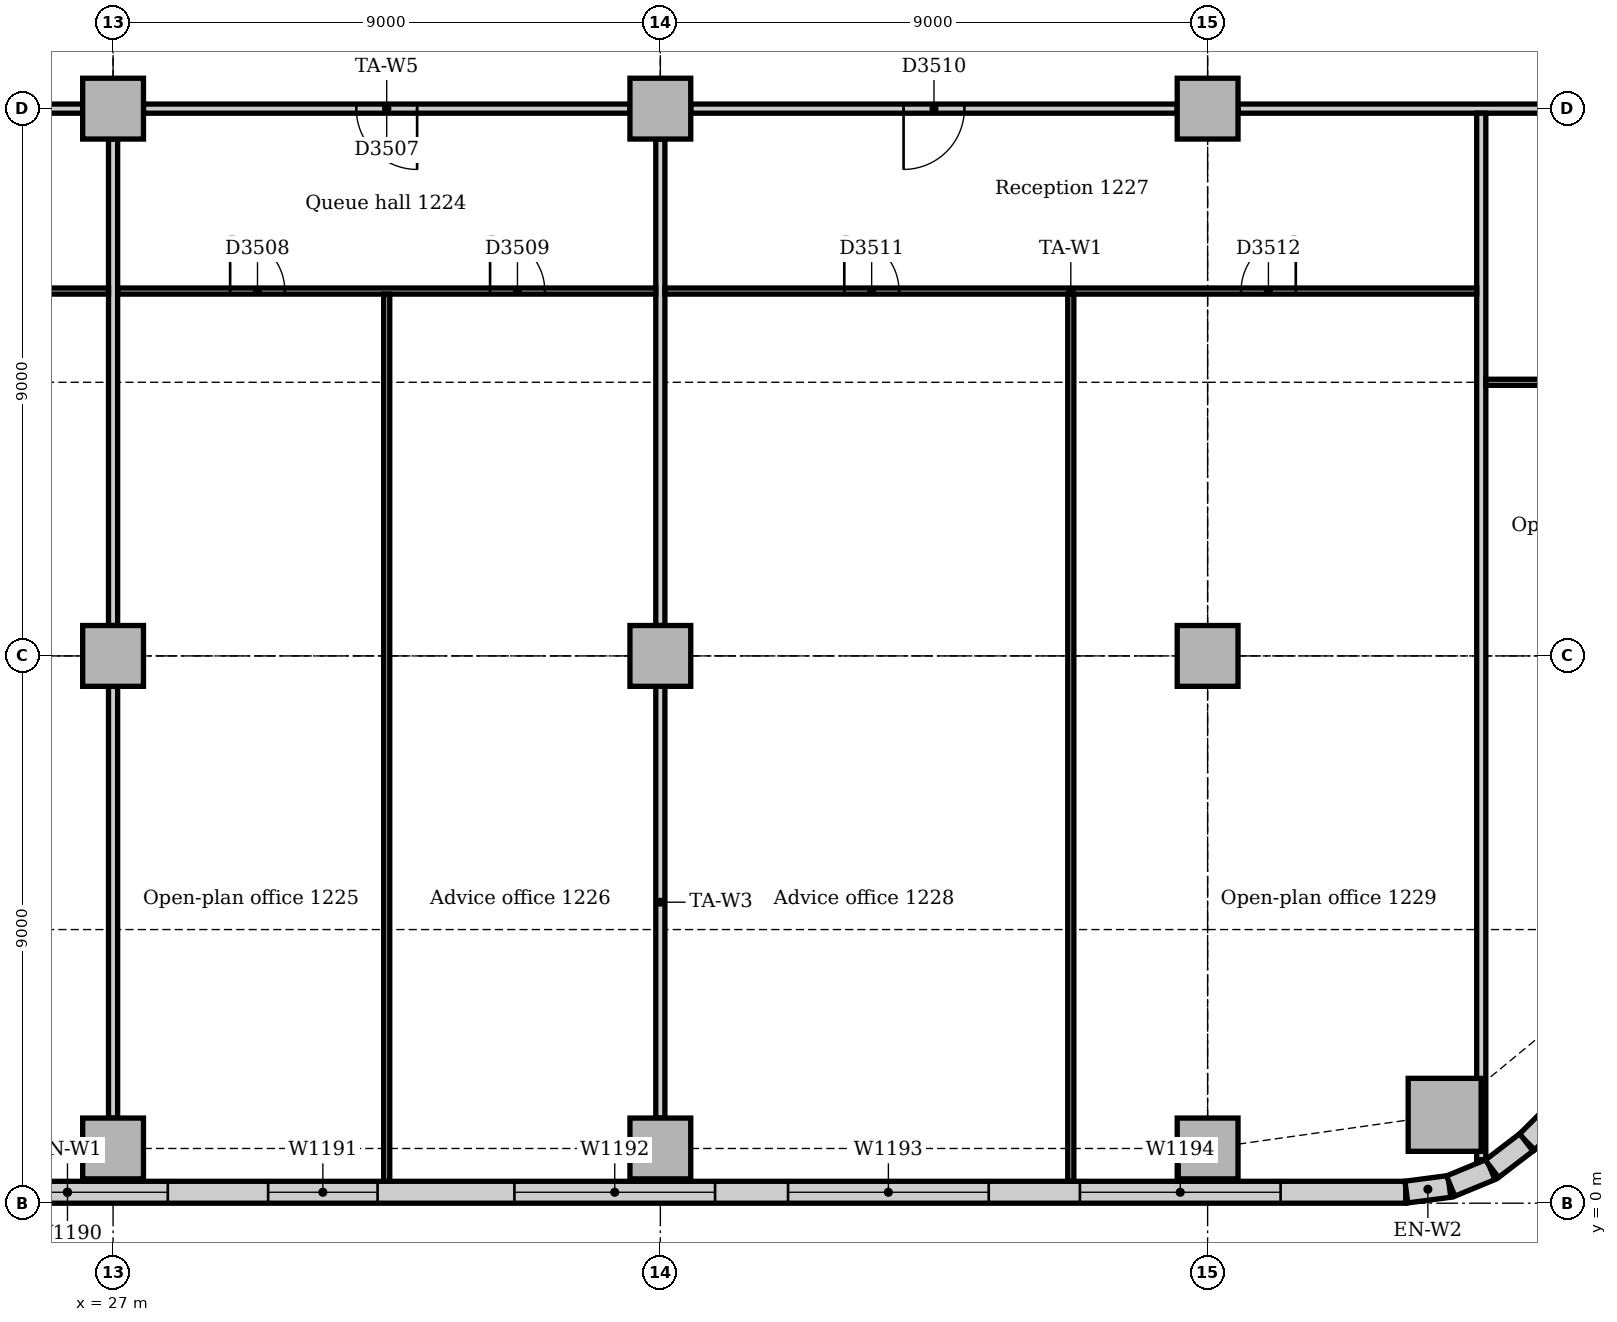
"""IFC4 building model, lengths in metres.
Left out: names, types, materials, properties, quantities, classifications, styles, units other than length and angle.
Written with IfcOpenShell. Run it as: python <this file> out.ifc"""

import sys

from ifc_helpers import new_model, si_unit, direction, frame, frame_2d, origin, origin_2d, place, context, subcontext, project, spatial, rectangle, extrude, element, fill, save


model = new_model("IFC4")
c1 = context("Model", 3, precision=1e-05, world=origin(), true_north=direction((0.0, 1.0)))
c2 = subcontext(c1, "Body", "Model", "MODEL_VIEW")
j1 = project(units=[si_unit("LENGTHUNIT", "METRE"), si_unit("PLANEANGLEUNIT", "RADIAN")], contexts=[c1])
p1 = place(None, origin())
s1 = spatial("IfcSite", under=j1, at=p1, CompositionType="ELEMENT")
p2 = place(p1, origin())
s2 = spatial("IfcBuilding", under=s1, at=p2, CompositionType="ELEMENT")
p3 = place(p2, frame((0.0, 0.0, 55.0)))
s3 = spatial("IfcBuildingStorey", under=s2, at=p3, CompositionType="ELEMENT", Elevation=55.0)
p4 = place(p3, frame((48.898, 1.453, 0.0), z_axis=(0.0, 0.0, 1.0), x_axis=(1.0, 0.0, 0.0)))
e1 = element("IfcColumn", 1, at=p4, inside=s3, PredefinedType="COLUMN", context=c2, shape_type="SweptSolid", body=[
    extrude(rectangle(XDim=1.2, YDim=1.2, at=origin_2d()), origin(), (0.0, 0.0, 1.0), 3.85),
])
for number, where, z_axis, x_axis in (
    (2, (27.0, 0.9, 0.0), (0.0, 0.0, 1.0), (1.0, 0.0, 0.0)),
    (3, (36.0, 0.9, 0.0), (0.0, 0.0, 1.0), (1.0, 0.0, 0.0)),
    (4, (45.0, 0.9, 0.0), (0.0, 0.0, 1.0), (1.0, 0.0, 0.0)),
    (5, (27.0, 9.0, 0.0), (0.0, 0.0, 1.0), (1.0, 0.0, 0.0)),
    (6, (27.0, 18.0, 0.0), (0.0, 0.0, 1.0), (1.0, 0.0, 0.0)),
    (7, (36.0, 9.0, 0.0), (0.0, 0.0, 1.0), (1.0, 0.0, 0.0)),
    (8, (36.0, 18.0, 0.0), (0.0, 0.0, 1.0), (1.0, 0.0, 0.0)),
    (9, (45.0, 9.0, 0.0), (0.0, 0.0, 1.0), (1.0, 0.0, 0.0)),
    (10, (45.0, 18.0, 0.0), (0.0, 0.0, 1.0), (1.0, 0.0, 0.0)),
):
    element("IfcColumn", number, at=place(p3, frame(where, z_axis=z_axis, x_axis=x_axis)), inside=s3, PredefinedType="COLUMN", context=c2, shape_type="SweptSolid", body=[
        extrude(rectangle(XDim=1.0, YDim=1.0, at=origin_2d()), origin(), (0.0, 0.0, 1.0), 3.85),
    ])
p5 = place(p3, frame((4.243, 0.18, 0.0), z_axis=(0.0, 0.0, 1.0), x_axis=(1.0, 0.0, 0.0)))
e11 = element("IfcWall", 11, at=p5, inside=s3, PredefinedType="STANDARD", context=c2, shape_type="SweptSolid", body=[
    extrude(rectangle(XDim=44.015, YDim=0.36, at=frame_2d((22.007, 0.0))), origin(), (0.0, 0.0, 1.0), 3.85),
])
p6 = place(p5, frame((2.707, 0.0, 0.9)))
e12 = element("IfcOpeningElement", 12, at=p6, cuts=e11, PredefinedType="OPENING", context=c2, shape_type="SweptSolid", body=[
    extrude(rectangle(XDim=3.3, YDim=1.6, at=frame_2d((1.65, 0.8))), frame((0.0, 0.19, 0.0), z_axis=(0.0, -1.0, 0.0), x_axis=(1.0, 0.0, 0.0)), (0.0, 0.0, 1.0), 0.38),
])
p7 = place(p5, frame((7.257, 0.0, 0.9)))
e13 = element("IfcOpeningElement", 13, at=p7, cuts=e11, PredefinedType="OPENING", context=c2, shape_type="SweptSolid", body=[
    extrude(rectangle(XDim=1.8, YDim=1.6, at=frame_2d((0.9, 0.8))), frame((0.0, 0.19, 0.0), z_axis=(0.0, -1.0, 0.0), x_axis=(1.0, 0.0, 0.0)), (0.0, 0.0, 1.0), 0.38),
])
p8 = place(p5, frame((11.357, 0.0, 0.9)))
e14 = element("IfcOpeningElement", 14, at=p8, cuts=e11, PredefinedType="OPENING", context=c2, shape_type="SweptSolid", body=[
    extrude(rectangle(XDim=3.3, YDim=1.6, at=frame_2d((1.65, 0.8))), frame((0.0, 0.19, 0.0), z_axis=(0.0, -1.0, 0.0), x_axis=(1.0, 0.0, 0.0)), (0.0, 0.0, 1.0), 0.38),
])
p9 = place(p5, frame((15.857, 0.0, 0.9)))
e15 = element("IfcOpeningElement", 15, at=p9, cuts=e11, PredefinedType="OPENING", context=c2, shape_type="SweptSolid", body=[
    extrude(rectangle(XDim=3.3, YDim=1.6, at=frame_2d((1.65, 0.8))), frame((0.0, 0.19, 0.0), z_axis=(0.0, -1.0, 0.0), x_axis=(1.0, 0.0, 0.0)), (0.0, 0.0, 1.0), 0.38),
])
p10 = place(p5, frame((20.357, 0.0, 0.9)))
e16 = element("IfcOpeningElement", 16, at=p10, cuts=e11, PredefinedType="OPENING", context=c2, shape_type="SweptSolid", body=[
    extrude(rectangle(XDim=3.3, YDim=1.6, at=frame_2d((1.65, 0.8))), frame((0.0, 0.19, 0.0), z_axis=(0.0, -1.0, 0.0), x_axis=(1.0, 0.0, 0.0)), (0.0, 0.0, 1.0), 0.38),
])
p11 = place(p5, frame((25.307, 0.0, 0.9)))
e17 = element("IfcOpeningElement", 17, at=p11, cuts=e11, PredefinedType="OPENING", context=c2, shape_type="SweptSolid", body=[
    extrude(rectangle(XDim=1.8, YDim=1.6, at=frame_2d((0.9, 0.8))), frame((0.0, 0.19, 0.0), z_axis=(0.0, -1.0, 0.0), x_axis=(1.0, 0.0, 0.0)), (0.0, 0.0, 1.0), 0.38),
])
p12 = place(p5, frame((29.357, 0.0, 0.9)))
e18 = element("IfcOpeningElement", 18, at=p12, cuts=e11, PredefinedType="OPENING", context=c2, shape_type="SweptSolid", body=[
    extrude(rectangle(XDim=3.3, YDim=1.6, at=frame_2d((1.65, 0.8))), frame((0.0, 0.19, 0.0), z_axis=(0.0, -1.0, 0.0), x_axis=(1.0, 0.0, 0.0)), (0.0, 0.0, 1.0), 0.38),
])
p13 = place(p5, frame((33.857, 0.0, 0.9)))
e19 = element("IfcOpeningElement", 19, at=p13, cuts=e11, PredefinedType="OPENING", context=c2, shape_type="SweptSolid", body=[
    extrude(rectangle(XDim=3.3, YDim=1.6, at=frame_2d((1.65, 0.8))), frame((0.0, 0.19, 0.0), z_axis=(0.0, -1.0, 0.0), x_axis=(1.0, 0.0, 0.0)), (0.0, 0.0, 1.0), 0.38),
])
p14 = place(p5, frame((38.657, 0.0, 0.9)))
e20 = element("IfcOpeningElement", 20, at=p14, cuts=e11, PredefinedType="OPENING", context=c2, shape_type="SweptSolid", body=[
    extrude(rectangle(XDim=3.3, YDim=1.6, at=frame_2d((1.65, 0.8))), frame((0.0, 0.19, 0.0), z_axis=(0.0, -1.0, 0.0), x_axis=(1.0, 0.0, 0.0)), (0.0, 0.0, 1.0), 0.38),
])
p15 = place(p3, frame((50.251, 1.006, 0.0), z_axis=(0.0, 0.0, 1.0), x_axis=(0.707106781187, 0.707106781187, 0.0)))
e21 = element("IfcWall", 21, at=p15, inside=s3, PredefinedType="STANDARD", context=c2, shape_type="SweptSolid", body=[
    extrude(rectangle(XDim=10.243, YDim=0.36, at=frame_2d((5.121, 0.0))), origin(), (0.0, 0.0, 1.0), 3.85),
])
p16 = place(p15, frame((3.421, 0.0, 0.9)))
e22 = element("IfcOpeningElement", 22, at=p16, cuts=e21, PredefinedType="OPENING", context=c2, shape_type="SweptSolid", body=[
    extrude(rectangle(XDim=1.8, YDim=1.6, at=frame_2d((0.9, 0.8))), frame((0.0, 0.19, 0.0), z_axis=(0.0, -1.0, 0.0), x_axis=(1.0, 0.0, 0.0)), (0.0, 0.0, 1.0), 0.38),
])
for number, where, z_axis, x_axis in (
    (23, (48.269, 0.183, 0.0), (0.0, 0.0, 1.0), (0.991, 0.131, 0.0)),
    (24, (48.997, 0.282, 0.0), (0.0, 0.0, 1.0), (0.924, 0.383, 0.0)),
):
    element("IfcWall", number, at=place(p3, frame(where, z_axis=z_axis, x_axis=x_axis)), inside=s3, PredefinedType="STANDARD", context=c2, shape_type="SweptSolid", body=[
        extrude(rectangle(XDim=0.713, YDim=0.36, at=frame_2d((0.356, 0.0))), origin(), (0.0, 0.0, 1.0), 3.85),
    ])
p17 = place(p3, frame((49.675, 0.566, 0.0), z_axis=(0.0, 0.0, 1.0), x_axis=(0.793321924995, 0.608802368033, 0.0)))
e25 = element("IfcWall", 25, at=p17, inside=s3, PredefinedType="STANDARD", context=c2, shape_type="SweptSolid", body=[
    extrude(rectangle(XDim=0.713, YDim=0.36, at=frame_2d((0.357, 0.0))), origin(), (0.0, 0.0, 1.0), 3.85),
])
p18 = place(p3, frame((45.5, 18.0, 0.0), z_axis=(0.0, 0.0, 1.0), x_axis=(1.0, 0.0, 0.0)))
e26 = element("IfcWall", 26, at=p18, inside=s3, PredefinedType="PARTITIONING", context=c2, shape_type="SweptSolid", body=[
    extrude(rectangle(XDim=8.0, YDim=0.15, at=frame_2d((4.0, 0.0))), origin(), (0.0, 0.0, 1.0), 3.15),
])
p19 = place(p3, frame((36.5, 18.0, 0.0), z_axis=(0.0, 0.0, 1.0), x_axis=(1.0, 0.0, 0.0)))
e27 = element("IfcWall", 27, at=p19, inside=s3, PredefinedType="PARTITIONING", context=c2, shape_type="SweptSolid", body=[
    extrude(rectangle(XDim=8.0, YDim=0.15, at=frame_2d((4.0, 0.0))), origin(), (0.0, 0.0, 1.0), 3.15),
])
p20 = place(p19, frame((3.5, 0.0, 0.0)))
e28 = element("IfcOpeningElement", 28, at=p20, cuts=e27, PredefinedType="OPENING", context=c2, shape_type="SweptSolid", body=[
    extrude(rectangle(XDim=1.0, YDim=2.1, at=frame_2d((0.5, 1.05))), frame((0.0, 0.085, 0.0), z_axis=(0.0, -1.0, 0.0), x_axis=(1.0, 0.0, 0.0)), (0.0, 0.0, 1.0), 0.17),
])
p21 = place(p3, frame((27.5, 18.0, 0.0), z_axis=(0.0, 0.0, 1.0), x_axis=(1.0, 0.0, 0.0)))
e29 = element("IfcWall", 29, at=p21, inside=s3, PredefinedType="PARTITIONING", context=c2, shape_type="SweptSolid", body=[
    extrude(rectangle(XDim=8.0, YDim=0.15, at=frame_2d((4.0, 0.0))), origin(), (0.0, 0.0, 1.0), 3.15),
])
p22 = place(p21, frame((3.5, 0.0, 0.0)))
e30 = element("IfcOpeningElement", 30, at=p22, cuts=e29, PredefinedType="OPENING", context=c2, shape_type="SweptSolid", body=[
    extrude(rectangle(XDim=1.0, YDim=2.1, at=frame_2d((0.5, 1.05))), frame((0.0, 0.085, 0.0), z_axis=(0.0, -1.0, 0.0), x_axis=(1.0, 0.0, 0.0)), (0.0, 0.0, 1.0), 0.17),
])
p23 = place(p3, frame((18.5, 18.0, 0.0), z_axis=(0.0, 0.0, 1.0), x_axis=(1.0, 0.0, 0.0)))
e31 = element("IfcWall", 31, at=p23, inside=s3, PredefinedType="PARTITIONING", context=c2, shape_type="SweptSolid", body=[
    extrude(rectangle(XDim=8.0, YDim=0.15, at=frame_2d((4.0, 0.0))), origin(), (0.0, 0.0, 1.0), 3.15),
])
p24 = place(p23, frame((3.5, 0.0, 0.0)))
e32 = element("IfcOpeningElement", 32, at=p24, cuts=e31, PredefinedType="OPENING", context=c2, shape_type="SweptSolid", body=[
    extrude(rectangle(XDim=1.0, YDim=2.1, at=frame_2d((0.5, 1.05))), frame((0.0, 0.085, 0.0), z_axis=(0.0, -1.0, 0.0), x_axis=(1.0, 0.0, 0.0)), (0.0, 0.0, 1.0), 0.17),
])
p25 = place(p3, frame((27.0, 1.4, 0.0), z_axis=(0.0, 0.0, 1.0), x_axis=(0.0, 1.0, 0.0)))
e33 = element("IfcWall", 33, at=p25, inside=s3, PredefinedType="PARTITIONING", context=c2, shape_type="SweptSolid", body=[
    extrude(rectangle(XDim=7.1, YDim=0.15, at=frame_2d((3.55, 0.0))), origin(), (0.0, 0.0, 1.0), 3.158),
])
p26 = place(p3, frame((27.0, 9.5, 0.0), z_axis=(0.0, 0.0, 1.0), x_axis=(0.0, 1.0, 0.0)))
e34 = element("IfcWall", 34, at=p26, inside=s3, PredefinedType="PARTITIONING", context=c2, shape_type="SweptSolid", body=[
    extrude(rectangle(XDim=8.0, YDim=0.15, at=frame_2d((4.0, 0.0))), origin(), (0.0, 0.0, 1.0), 3.158),
])
p27 = place(p3, frame((36.0, 1.4, 0.0), z_axis=(0.0, 0.0, 1.0), x_axis=(0.0, 1.0, 0.0)))
e35 = element("IfcWall", 35, at=p27, inside=s3, PredefinedType="PARTITIONING", context=c2, shape_type="SweptSolid", body=[
    extrude(rectangle(XDim=7.1, YDim=0.15, at=frame_2d((3.55, 0.0))), origin(), (0.0, 0.0, 1.0), 3.158),
])
p28 = place(p3, frame((36.0, 9.5, 0.0), z_axis=(0.0, 0.0, 1.0), x_axis=(0.0, 1.0, 0.0)))
e36 = element("IfcWall", 36, at=p28, inside=s3, PredefinedType="PARTITIONING", context=c2, shape_type="SweptSolid", body=[
    extrude(rectangle(XDim=8.0, YDim=0.15, at=frame_2d((4.0, 0.0))), origin(), (0.0, 0.0, 1.0), 3.158),
])
p29 = place(p3, frame((49.5, 0.716, 0.0), z_axis=(0.0, 0.0, 1.0), x_axis=(0.0, 1.0, 0.0)))
e37 = element("IfcWall", 37, at=p29, inside=s3, PredefinedType="PARTITIONING", context=c2, shape_type="SweptSolid", body=[
    extrude(rectangle(XDim=17.209, YDim=0.15, at=frame_2d((8.604, 0.0))), origin(), (0.0, 0.0, 1.0), 3.85),
])
p30 = place(p3, frame((13.575, 15.0, 0.0), z_axis=(0.0, 0.0, 1.0), x_axis=(1.0, 0.0, 0.0)))
e38 = element("IfcWall", 38, at=p30, inside=s3, PredefinedType="PARTITIONING", context=c2, shape_type="SweptSolid", body=[
    extrude(rectangle(XDim=13.35, YDim=0.1, at=frame_2d((6.675, 0.0))), origin(), (0.0, 0.0, 1.0), 3.85),
])
p31 = place(p30, frame((6.2, 0.0, 0.0)))
e39 = element("IfcOpeningElement", 39, at=p31, cuts=e38, PredefinedType="OPENING", context=c2, shape_type="SweptSolid", body=[
    extrude(rectangle(XDim=0.9, YDim=2.1, at=frame_2d((0.45, 1.05))), frame((0.0, 0.06, 0.0), z_axis=(0.0, -1.0, 0.0), x_axis=(1.0, 0.0, 0.0)), (0.0, 0.0, 1.0), 0.12),
])
p32 = place(p3, frame((27.075, 15.0, 0.0), z_axis=(0.0, 0.0, 1.0), x_axis=(1.0, 0.0, 0.0)))
e40 = element("IfcWall", 40, at=p32, inside=s3, PredefinedType="PARTITIONING", context=c2, shape_type="SweptSolid", body=[
    extrude(rectangle(XDim=8.85, YDim=0.1, at=frame_2d((4.425, 0.0))), origin(), (0.0, 0.0, 1.0), 3.85),
])
p33 = place(p32, frame((1.85, 0.0, 0.0)))
e41 = element("IfcOpeningElement", 41, at=p33, cuts=e40, PredefinedType="OPENING", context=c2, shape_type="SweptSolid", body=[
    extrude(rectangle(XDim=0.9, YDim=2.1, at=frame_2d((0.45, 1.05))), frame((0.0, 0.06, 0.0), z_axis=(0.0, -1.0, 0.0), x_axis=(1.0, 0.0, 0.0)), (0.0, 0.0, 1.0), 0.12),
])
p34 = place(p32, frame((6.125, 0.0, 0.0)))
e42 = element("IfcOpeningElement", 42, at=p34, cuts=e40, PredefinedType="OPENING", context=c2, shape_type="SweptSolid", body=[
    extrude(rectangle(XDim=0.9, YDim=2.1, at=frame_2d((0.45, 1.05))), frame((0.0, 0.06, 0.0), z_axis=(0.0, -1.0, 0.0), x_axis=(1.0, 0.0, 0.0)), (0.0, 0.0, 1.0), 0.12),
])
p35 = place(p3, frame((36.075, 15.0, 0.0), z_axis=(0.0, 0.0, 1.0), x_axis=(1.0, 0.0, 0.0)))
e43 = element("IfcWall", 43, at=p35, inside=s3, PredefinedType="PARTITIONING", context=c2, shape_type="SweptSolid", body=[
    extrude(rectangle(XDim=13.35, YDim=0.1, at=frame_2d((6.675, 0.0))), origin(), (0.0, 0.0, 1.0), 3.85),
])
p36 = place(p35, frame((2.95, 0.0, 0.0)))
e44 = element("IfcOpeningElement", 44, at=p36, cuts=e43, PredefinedType="OPENING", context=c2, shape_type="SweptSolid", body=[
    extrude(rectangle(XDim=0.9, YDim=2.1, at=frame_2d((0.45, 1.05))), frame((0.0, 0.06, 0.0), z_axis=(0.0, -1.0, 0.0), x_axis=(1.0, 0.0, 0.0)), (0.0, 0.0, 1.0), 0.12),
])
p37 = place(p35, frame((9.475, 0.0, 0.0)))
e45 = element("IfcOpeningElement", 45, at=p37, cuts=e43, PredefinedType="OPENING", context=c2, shape_type="SweptSolid", body=[
    extrude(rectangle(XDim=0.9, YDim=2.1, at=frame_2d((0.45, 1.05))), frame((0.0, 0.06, 0.0), z_axis=(0.0, -1.0, 0.0), x_axis=(1.0, 0.0, 0.0)), (0.0, 0.0, 1.0), 0.12),
])
for number, where, z_axis, x_axis in (
    (46, (31.5, 0.36, 0.0), (0.0, 0.0, 1.0), (0.0, 1.0, 0.0)),
    (47, (42.75, 0.36, 0.0), (0.0, 0.0, 1.0), (0.0, 1.0, 0.0)),
):
    element("IfcWall", number, at=place(p3, frame(where, z_axis=z_axis, x_axis=x_axis)), inside=s3, PredefinedType="PARTITIONING", context=c2, shape_type="SweptSolid", body=[
        extrude(rectangle(XDim=14.59, YDim=0.1, at=frame_2d((7.295, 0.0))), origin(), (0.0, 0.0, 1.0), 3.85),
    ])
p38 = place(p3, frame((49.575, 13.5, 0.0), z_axis=(0.0, 0.0, 1.0), x_axis=(1.0, 0.0, 0.0)))
e48 = element("IfcWall", 48, at=p38, inside=s3, PredefinedType="PARTITIONING", context=c2, shape_type="SweptSolid", body=[
    extrude(rectangle(XDim=8.565, YDim=0.1, at=frame_2d((4.282, 0.0))), origin(), (0.0, 0.0, 1.0), 3.35),
])
p39 = place(p38, frame((1.85, 0.0, 0.0)))
e49 = element("IfcOpeningElement", 49, at=p39, cuts=e48, PredefinedType="OPENING", context=c2, shape_type="SweptSolid", body=[
    extrude(rectangle(XDim=0.9, YDim=2.1, at=frame_2d((0.45, 1.05))), frame((0.0, 0.06, 0.0), z_axis=(0.0, -1.0, 0.0), x_axis=(1.0, 0.0, 0.0)), (0.0, 0.0, 1.0), 0.12),
])
p40 = place(p38, frame((5.975, 0.0, 0.0)))
e50 = element("IfcOpeningElement", 50, at=p40, cuts=e48, PredefinedType="OPENING", context=c2, shape_type="SweptSolid", body=[
    extrude(rectangle(XDim=0.9, YDim=2.1, at=frame_2d((0.45, 1.05))), frame((0.0, 0.06, 0.0), z_axis=(0.0, -1.0, 0.0), x_axis=(1.0, 0.0, 0.0)), (0.0, 0.0, 1.0), 0.12),
])
p41 = place(p10, origin())
e51 = element("IfcWindow", 51, at=p41, inside=s3, PartitioningType="SINGLE_PANEL", PredefinedType="WINDOW", context=c2, shape_type="SweptSolid", body=[
    extrude(rectangle(XDim=3.3, YDim=1.6, at=frame_2d((1.65, 0.8))), frame((0.0, 0.13, 0.0), z_axis=(0.0, -1.0, 0.0), x_axis=(1.0, 0.0, 0.0)), (0.0, 0.0, 1.0), 0.06),
])
fill(e16, e51)
p42 = place(p11, origin())
e52 = element("IfcWindow", 52, at=p42, inside=s3, PartitioningType="SINGLE_PANEL", PredefinedType="WINDOW", context=c2, shape_type="SweptSolid", body=[
    extrude(rectangle(XDim=1.8, YDim=1.6, at=frame_2d((0.9, 0.8))), frame((0.0, 0.13, 0.0), z_axis=(0.0, -1.0, 0.0), x_axis=(1.0, 0.0, 0.0)), (0.0, 0.0, 1.0), 0.06),
])
fill(e17, e52)
p43 = place(p12, origin())
e53 = element("IfcWindow", 53, at=p43, inside=s3, PartitioningType="SINGLE_PANEL", PredefinedType="WINDOW", context=c2, shape_type="SweptSolid", body=[
    extrude(rectangle(XDim=3.3, YDim=1.6, at=frame_2d((1.65, 0.8))), frame((0.0, 0.13, 0.0), z_axis=(0.0, -1.0, 0.0), x_axis=(1.0, 0.0, 0.0)), (0.0, 0.0, 1.0), 0.06),
])
fill(e18, e53)
p44 = place(p13, origin())
e54 = element("IfcWindow", 54, at=p44, inside=s3, PartitioningType="SINGLE_PANEL", PredefinedType="WINDOW", context=c2, shape_type="SweptSolid", body=[
    extrude(rectangle(XDim=3.3, YDim=1.6, at=frame_2d((1.65, 0.8))), frame((0.0, 0.13, 0.0), z_axis=(0.0, -1.0, 0.0), x_axis=(1.0, 0.0, 0.0)), (0.0, 0.0, 1.0), 0.06),
])
fill(e19, e54)
p45 = place(p14, origin())
e55 = element("IfcWindow", 55, at=p45, inside=s3, PartitioningType="SINGLE_PANEL", PredefinedType="WINDOW", context=c2, shape_type="SweptSolid", body=[
    extrude(rectangle(XDim=3.3, YDim=1.6, at=frame_2d((1.65, 0.8))), frame((0.0, 0.13, 0.0), z_axis=(0.0, -1.0, 0.0), x_axis=(1.0, 0.0, 0.0)), (0.0, 0.0, 1.0), 0.06),
])
fill(e20, e55)
p46 = place(p22, frame((1.0, 0.0, 0.0), z_axis=(0.0, 0.0, 1.0), x_axis=(-1.0, 0.0, 0.0)))
e56 = element("IfcDoor", 56, at=p46, inside=s3, OperationType="SINGLE_SWING_LEFT", PredefinedType="DOOR", context=c2, shape_type="SweptSolid", body=[
    extrude(rectangle(XDim=1.0, YDim=2.1, at=frame_2d((0.5, 1.05))), frame((0.0, 0.025, 0.0), z_axis=(0.0, -1.0, 0.0), x_axis=(1.0, 0.0, 0.0)), (0.0, 0.0, 1.0), 0.05),
])
fill(e30, e56)
p47 = place(p33, origin())
e57 = element("IfcDoor", 57, at=p47, inside=s3, OperationType="SINGLE_SWING_LEFT", PredefinedType="DOOR", context=c2, shape_type="SweptSolid", body=[
    extrude(rectangle(XDim=0.9, YDim=2.1, at=frame_2d((0.45, 1.05))), frame((0.0, 0.025, 0.0), z_axis=(0.0, -1.0, 0.0), x_axis=(1.0, 0.0, 0.0)), (0.0, 0.0, 1.0), 0.05),
])
fill(e41, e57)
p48 = place(p34, origin())
e58 = element("IfcDoor", 58, at=p48, inside=s3, OperationType="SINGLE_SWING_LEFT", PredefinedType="DOOR", context=c2, shape_type="SweptSolid", body=[
    extrude(rectangle(XDim=0.9, YDim=2.1, at=frame_2d((0.45, 1.05))), frame((0.0, 0.025, 0.0), z_axis=(0.0, -1.0, 0.0), x_axis=(1.0, 0.0, 0.0)), (0.0, 0.0, 1.0), 0.05),
])
fill(e42, e58)
p49 = place(p20, frame((1.0, 0.0, 0.0), z_axis=(0.0, 0.0, 1.0), x_axis=(-1.0, 0.0, 0.0)))
e59 = element("IfcDoor", 59, at=p49, inside=s3, OperationType="SINGLE_SWING_RIGHT", PredefinedType="DOOR", context=c2, shape_type="SweptSolid", body=[
    extrude(rectangle(XDim=1.0, YDim=2.1, at=frame_2d((0.5, 1.05))), frame((0.0, 0.025, 0.0), z_axis=(0.0, -1.0, 0.0), x_axis=(1.0, 0.0, 0.0)), (0.0, 0.0, 1.0), 0.05),
])
fill(e28, e59)
p50 = place(p36, origin())
e60 = element("IfcDoor", 60, at=p50, inside=s3, OperationType="SINGLE_SWING_LEFT", PredefinedType="DOOR", context=c2, shape_type="SweptSolid", body=[
    extrude(rectangle(XDim=0.9, YDim=2.1, at=frame_2d((0.45, 1.05))), frame((0.0, 0.025, 0.0), z_axis=(0.0, -1.0, 0.0), x_axis=(1.0, 0.0, 0.0)), (0.0, 0.0, 1.0), 0.05),
])
fill(e44, e60)
p51 = place(p37, origin())
e61 = element("IfcDoor", 61, at=p51, inside=s3, OperationType="SINGLE_SWING_RIGHT", PredefinedType="DOOR", context=c2, shape_type="SweptSolid", body=[
    extrude(rectangle(XDim=0.9, YDim=2.1, at=frame_2d((0.45, 1.05))), frame((0.0, 0.025, 0.0), z_axis=(0.0, -1.0, 0.0), x_axis=(1.0, 0.0, 0.0)), (0.0, 0.0, 1.0), 0.05),
])
fill(e45, e61)
save(model, sys.argv[1])
